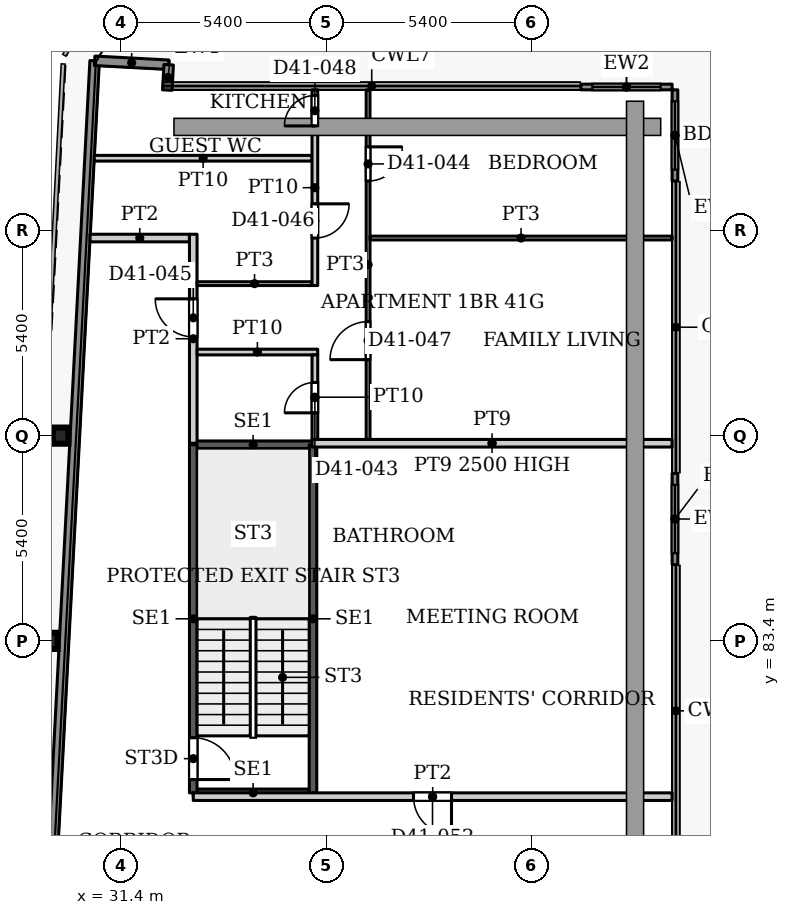
"""IFC4 building model, lengths in metres.
Left out: names, types, materials, properties, quantities, classifications, styles, units other than length and angle.
Written with IfcOpenShell. Run it as: python <this file> out.ifc"""

import sys

from ifc_helpers import new_model, si_unit, direction, frame, frame_2d, origin, origin_2d, place, context, subcontext, project, spatial, rectangle, i_section, extrude, source, transform, mapped, element, fill, save


model = new_model("IFC4")
c1 = context("Model", 3, precision=1e-05, world=origin(), true_north=direction((0.0, 1.0)))
c2 = subcontext(c1, "Body", "Model", "MODEL_VIEW")
j1 = project(units=[si_unit("LENGTHUNIT", "METRE"), si_unit("PLANEANGLEUNIT", "RADIAN")], contexts=[c1])
p1 = place(None, origin())
s1 = spatial("IfcSite", under=j1, at=p1, CompositionType="ELEMENT")
p2 = place(p1, origin())
s2 = spatial("IfcBuilding", under=s1, at=p2, CompositionType="ELEMENT")
p3 = place(p2, frame((0.0, 0.0, 176.0)))
s3 = spatial("IfcBuildingStorey", under=s2, at=p3, CompositionType="ELEMENT", Elevation=176.0)
for number, where, z_axis, x_axis in (
    (1, (29.527, 83.4, 0.0), (0.0, 0.0, 1.0), (1.0, 0.0, 0.0)),
    (2, (29.811, 88.8, 0.0), (0.0, 0.0, 1.0), (1.0, 0.0, 0.0)),
):
    element("IfcColumn", number, at=place(p3, frame(where, z_axis=z_axis, x_axis=x_axis)), inside=s3, PredefinedType="COLUMN", context=c2, shape_type="SweptSolid", body=[
        extrude(i_section(OverallWidth=0.409, OverallDepth=0.425, WebThickness=0.033, FlangeThickness=0.052, FilletRadius=0.013, at=origin_2d()), origin(), (0.0, 0.0, 1.0), 3.9),
    ])
p4 = place(p3, frame((27.195, 31.969, 0.0), z_axis=(0.0, 0.0, 1.0), x_axis=(0.052554995867, 0.998618031286, 0.0)))
e3 = element("IfcWall", 3, at=p4, inside=s3, PredefinedType="SOLIDWALL", context=c2, shape_type="SweptSolid", body=[
    extrude(rectangle(XDim=66.787, YDim=0.25, at=frame_2d((33.394, 0.0))), origin(), (0.0, 0.0, 1.0), 3.75),
])
p5 = place(p3, frame((30.705, 98.664, 0.0), z_axis=(0.0, 0.0, 1.0), x_axis=(0.998577785791, -0.053314216913, 0.0)))
e4 = element("IfcWall", 4, at=p5, inside=s3, PredefinedType="SOLIDWALL", context=c2, shape_type="SweptSolid", body=[
    extrude(rectangle(XDim=1.951, YDim=0.25, at=frame_2d((0.975, 0.0))), origin(), (0.0, 0.0, 1.0), 3.75),
])
p6 = place(p3, frame((32.653, 98.56, 0.0), z_axis=(0.0, 0.0, 1.0), x_axis=(-0.054093451632, -0.998535877418, 0.0)))
e5 = element("IfcWall", 5, at=p6, inside=s3, PredefinedType="SOLIDWALL", context=c2, shape_type="SweptSolid", body=[
    extrude(rectangle(XDim=0.668, YDim=0.25, at=frame_2d((0.334, 0.0))), origin(), (0.0, 0.0, 1.0), 3.75),
])
p7 = place(p3, frame((43.5, 97.975, 0.0), z_axis=(0.0, 0.0, 1.0), x_axis=(1.0, 0.0, 0.0)))
e6 = element("IfcWall", 6, at=p7, inside=s3, PredefinedType="SOLIDWALL", context=c2, shape_type="SweptSolid", body=[
    extrude(rectangle(XDim=2.4, YDim=0.15, at=frame_2d((1.2, 0.0))), origin(), (0.0, 0.0, 1.0), 3.75),
])
p8 = place(p7, frame((0.3, 0.0, 0.0)))
e7 = element("IfcOpeningElement", 7, at=p8, cuts=e6, PredefinedType="OPENING", context=c2, shape_type="SweptSolid", body=[
    extrude(rectangle(XDim=1.8, YDim=2.4, at=frame_2d((0.9, 1.2))), frame((0.0, 0.085, 0.0), z_axis=(0.0, -1.0, 0.0), x_axis=(1.0, 0.0, 0.0)), (0.0, 0.0, 1.0), 0.17),
])
p9 = place(p3, frame((45.975, 97.9, 0.0), z_axis=(0.0, 0.0, 1.0), x_axis=(0.0, -1.0, 0.0)))
e8 = element("IfcWall", 8, at=p9, inside=s3, PredefinedType="SOLIDWALL", context=c2, shape_type="SweptSolid", body=[
    extrude(rectangle(XDim=2.4, YDim=0.15, at=frame_2d((1.2, 0.0))), origin(), (0.0, 0.0, 1.0), 3.75),
])
p10 = place(p9, frame((0.3, 0.0, 0.0)))
e9 = element("IfcOpeningElement", 9, at=p10, cuts=e8, PredefinedType="OPENING", context=c2, shape_type="SweptSolid", body=[
    extrude(rectangle(XDim=1.8, YDim=2.4, at=frame_2d((0.9, 1.2))), frame((0.0, 0.085, 0.0), z_axis=(0.0, -1.0, 0.0), x_axis=(1.0, 0.0, 0.0)), (0.0, 0.0, 1.0), 0.17),
])
p11 = place(p3, frame((45.975, 87.806, 0.0), z_axis=(0.0, 0.0, 1.0), x_axis=(0.0, -1.0, 0.0)))
e10 = element("IfcWall", 10, at=p11, inside=s3, PredefinedType="SOLIDWALL", context=c2, shape_type="SweptSolid", body=[
    extrude(rectangle(XDim=2.4, YDim=0.15, at=frame_2d((1.2, 0.0))), origin(), (0.0, 0.0, 1.0), 3.75),
])
p12 = place(p11, frame((0.3, 0.0, 0.0)))
e11 = element("IfcOpeningElement", 11, at=p12, cuts=e10, PredefinedType="OPENING", context=c2, shape_type="SweptSolid", body=[
    extrude(rectangle(XDim=1.8, YDim=2.4, at=frame_2d((0.9, 1.2))), frame((0.0, 0.085, 0.0), z_axis=(0.0, -1.0, 0.0), x_axis=(1.0, 0.0, 0.0)), (0.0, 0.0, 1.0), 0.17),
])
for number, where, z_axis, x_axis in (
    (12, (33.3, 79.4, 0.0), (0.0, 0.0, 1.0), (1.0, 0.0, 0.0)),
    (13, (33.3, 88.56, 0.0), (0.0, 0.0, 1.0), (1.0, 0.0, 0.0)),
):
    element("IfcWall", number, at=place(p3, frame(where, z_axis=z_axis, x_axis=x_axis)), inside=s3, PredefinedType="SHEAR", context=c2, shape_type="SweptSolid", body=[
        extrude(rectangle(XDim=3.15, YDim=0.2, at=frame_2d((1.575, 0.0))), origin(), (0.0, 0.0, 1.0), 3.9),
    ])
p13 = place(p3, frame((33.3, 79.4, 0.0), z_axis=(0.0, 0.0, 1.0), x_axis=(0.0, 1.0, 0.0)))
e14 = element("IfcWall", 14, at=p13, inside=s3, PredefinedType="SHEAR", context=c2, shape_type="SweptSolid", body=[
    extrude(rectangle(XDim=9.16, YDim=0.2, at=frame_2d((4.58, 0.0))), origin(), (0.0, 0.0, 1.0), 3.9),
])
p14 = place(p13, frame((0.35, 0.0, 0.0)))
e15 = element("IfcOpeningElement", 15, at=p14, cuts=e14, PredefinedType="OPENING", context=c2, shape_type="SweptSolid", body=[
    extrude(rectangle(XDim=1.1, YDim=2.2, at=frame_2d((0.55, 1.1))), frame((0.0, 0.11, 0.0), z_axis=(0.0, -1.0, 0.0), x_axis=(1.0, 0.0, 0.0)), (0.0, 0.0, 1.0), 0.22),
])
p15 = place(p3, frame((36.45, 79.4, 0.0), z_axis=(0.0, 0.0, 1.0), x_axis=(0.0, 1.0, 0.0)))
e16 = element("IfcWall", 16, at=p15, inside=s3, PredefinedType="SHEAR", context=c2, shape_type="SweptSolid", body=[
    extrude(rectangle(XDim=9.16, YDim=0.2, at=frame_2d((4.58, 0.0))), origin(), (0.0, 0.0, 1.0), 3.9),
])
p16 = place(p3, frame((30.695, 96.1, 0.0), z_axis=(0.0, 0.0, 1.0), x_axis=(1.0, 0.0, 0.0)))
e17 = element("IfcWall", 17, at=p16, inside=s3, PredefinedType="PARTITIONING", context=c2, shape_type="SweptSolid", body=[
    extrude(rectangle(XDim=5.73, YDim=0.15, at=frame_2d((2.865, 0.0))), origin(), (0.0, 0.0, 1.0), 3.6),
])
p17 = place(p3, frame((30.585, 94.0, 0.0), z_axis=(0.0, 0.0, 1.0), x_axis=(1.0, 0.0, 0.0)))
e18 = element("IfcWall", 18, at=p17, inside=s3, PredefinedType="PARTITIONING", context=c2, shape_type="SweptSolid", body=[
    extrude(rectangle(XDim=2.615, YDim=0.2, at=frame_2d((1.308, 0.0))), origin(), (0.0, 0.0, 1.0), 3.6),
])
p18 = place(p3, frame((33.3, 79.3, 0.0), z_axis=(0.0, 0.0, 1.0), x_axis=(1.0, 0.0, 0.0)))
e19 = element("IfcWall", 19, at=p18, inside=s3, PredefinedType="PARTITIONING", context=c2, shape_type="SweptSolid", body=[
    extrude(rectangle(XDim=12.6, YDim=0.2, at=frame_2d((6.3, 0.0))), origin(), (0.0, 0.0, 1.0), 3.6),
])
p19 = place(p18, frame((5.795, 0.0, 0.0)))
e20 = element("IfcOpeningElement", 20, at=p19, cuts=e19, PredefinedType="OPENING", context=c2, shape_type="SweptSolid", body=[
    extrude(rectangle(XDim=1.0, YDim=2.1, at=frame_2d((0.5, 1.05))), frame((0.0, 0.11, 0.0), z_axis=(0.0, -1.0, 0.0), x_axis=(1.0, 0.0, 0.0)), (0.0, 0.0, 1.0), 0.22),
])
p20 = place(p3, frame((33.3, 88.6, 0.0), z_axis=(0.0, 0.0, 1.0), x_axis=(0.0, 1.0, 0.0)))
e21 = element("IfcWall", 21, at=p20, inside=s3, PredefinedType="PARTITIONING", context=c2, shape_type="SweptSolid", body=[
    extrude(rectangle(XDim=5.5, YDim=0.2, at=frame_2d((2.75, 0.0))), origin(), (0.0, 0.0, 1.0), 3.6),
])
p21 = place(p20, frame((2.8, 0.0, 0.0)))
e22 = element("IfcOpeningElement", 22, at=p21, cuts=e21, PredefinedType="OPENING", context=c2, shape_type="SweptSolid", body=[
    extrude(rectangle(XDim=1.0, YDim=2.1, at=frame_2d((0.5, 1.05))), frame((0.0, 0.11, 0.0), z_axis=(0.0, -1.0, 0.0), x_axis=(1.0, 0.0, 0.0)), (0.0, 0.0, 1.0), 0.22),
])
p22 = place(p3, frame((33.4, 91.0, 0.0), z_axis=(0.0, 0.0, 1.0), x_axis=(1.0, 0.0, 0.0)))
e23 = element("IfcWall", 23, at=p22, inside=s3, PredefinedType="PARTITIONING", context=c2, shape_type="SweptSolid", body=[
    extrude(rectangle(XDim=3.175, YDim=0.15, at=frame_2d((1.587, 0.0))), origin(), (0.0, 0.0, 1.0), 3.6),
])
p23 = place(p3, frame((33.4, 92.8, 0.0), z_axis=(0.0, 0.0, 1.0), x_axis=(1.0, 0.0, 0.0)))
e24 = element("IfcWall", 24, at=p23, inside=s3, PredefinedType="PARTITIONING", context=c2, shape_type="SweptSolid", body=[
    extrude(rectangle(XDim=3.025, YDim=0.1, at=frame_2d((1.513, 0.0))), origin(), (0.0, 0.0, 1.0), 3.6),
])
p24 = place(p3, frame((36.425, 88.6, 0.0), z_axis=(0.0, 0.0, 1.0), x_axis=(1.0, 0.0, 0.0)))
e25 = element("IfcWall", 25, at=p24, inside=s3, PredefinedType="PARTITIONING", context=c2, shape_type="SweptSolid", body=[
    extrude(rectangle(XDim=9.475, YDim=0.2, at=frame_2d((4.737, 0.0))), origin(), (0.0, 0.0, 1.0), 2.5),
])
p25 = place(p3, frame((36.5, 88.7, 0.0), z_axis=(0.0, 0.0, 1.0), x_axis=(0.0, 1.0, 0.0)))
e26 = element("IfcWall", 26, at=p25, inside=s3, PredefinedType="PARTITIONING", context=c2, shape_type="SweptSolid", body=[
    extrude(rectangle(XDim=2.225, YDim=0.15, at=frame_2d((1.113, 0.0))), origin(), (0.0, 0.0, 1.0), 3.6),
])
p26 = place(p25, frame((0.7, 0.0, 0.0)))
e27 = element("IfcOpeningElement", 27, at=p26, cuts=e26, PredefinedType="OPENING", context=c2, shape_type="SweptSolid", body=[
    extrude(rectangle(XDim=0.8, YDim=2.1, at=frame_2d((0.4, 1.05))), frame((0.0, 0.085, 0.0), z_axis=(0.0, -1.0, 0.0), x_axis=(1.0, 0.0, 0.0)), (0.0, 0.0, 1.0), 0.17),
])
p27 = place(p3, frame((36.5, 92.75, 0.0), z_axis=(0.0, 0.0, 1.0), x_axis=(0.0, 1.0, 0.0)))
e28 = element("IfcWall", 28, at=p27, inside=s3, PredefinedType="PARTITIONING", context=c2, shape_type="SweptSolid", body=[
    extrude(rectangle(XDim=5.15, YDim=0.15, at=frame_2d((2.575, 0.0))), origin(), (0.0, 0.0, 1.0), 3.6),
])
p28 = place(p27, frame((1.25, 0.0, 0.0)))
e29 = element("IfcOpeningElement", 29, at=p28, cuts=e28, PredefinedType="OPENING", context=c2, shape_type="SweptSolid", body=[
    extrude(rectangle(XDim=0.9, YDim=2.1, at=frame_2d((0.45, 1.05))), frame((0.0, 0.085, 0.0), z_axis=(0.0, -1.0, 0.0), x_axis=(1.0, 0.0, 0.0)), (0.0, 0.0, 1.0), 0.17),
])
p29 = place(p27, frame((4.2, 0.0, 0.0)))
e30 = element("IfcOpeningElement", 30, at=p29, cuts=e28, PredefinedType="OPENING", context=c2, shape_type="SweptSolid", body=[
    extrude(rectangle(XDim=0.8, YDim=2.1, at=frame_2d((0.4, 1.05))), frame((0.0, 0.085, 0.0), z_axis=(0.0, -1.0, 0.0), x_axis=(1.0, 0.0, 0.0)), (0.0, 0.0, 1.0), 0.17),
])
p30 = place(p3, frame((37.9, 88.7, 0.0), z_axis=(0.0, 0.0, 1.0), x_axis=(0.0, 1.0, 0.0)))
e31 = element("IfcWall", 31, at=p30, inside=s3, PredefinedType="PARTITIONING", context=c2, shape_type="SweptSolid", body=[
    extrude(rectangle(XDim=9.2, YDim=0.1, at=frame_2d((4.6, 0.0))), origin(), (0.0, 0.0, 1.0), 3.6),
])
p31 = place(p30, frame((6.8, 0.0, 0.0)))
e32 = element("IfcOpeningElement", 32, at=p31, cuts=e31, PredefinedType="OPENING", context=c2, shape_type="SweptSolid", body=[
    extrude(rectangle(XDim=0.9, YDim=2.1, at=frame_2d((0.45, 1.05))), frame((0.0, 0.06, 0.0), z_axis=(0.0, -1.0, 0.0), x_axis=(1.0, 0.0, 0.0)), (0.0, 0.0, 1.0), 0.12),
])
p32 = place(p30, frame((2.1, 0.0, 0.0)))
e33 = element("IfcOpeningElement", 33, at=p32, cuts=e31, PredefinedType="OPENING", context=c2, shape_type="SweptSolid", body=[
    extrude(rectangle(XDim=1.0, YDim=2.1, at=frame_2d((0.5, 1.05))), frame((0.0, 0.06, 0.0), z_axis=(0.0, -1.0, 0.0), x_axis=(1.0, 0.0, 0.0)), (0.0, 0.0, 1.0), 0.12),
])
p33 = place(p3, frame((37.95, 94.0, 0.0), z_axis=(0.0, 0.0, 1.0), x_axis=(1.0, 0.0, 0.0)))
e34 = element("IfcWall", 34, at=p33, inside=s3, PredefinedType="PARTITIONING", context=c2, shape_type="SweptSolid", body=[
    extrude(rectangle(XDim=7.95, YDim=0.1, at=frame_2d((3.975, 0.0))), origin(), (0.0, 0.0, 1.0), 3.6),
])
m1 = source(origin(), c2, "Body", "SweptSolid", [
    extrude(rectangle(XDim=1.8, YDim=2.4, at=frame_2d((0.9, 1.2))), frame((0.0, 0.025, 0.0), z_axis=(0.0, -1.0, 0.0), x_axis=(1.0, 0.0, 0.0)), (0.0, 0.0, 1.0), 0.05),
])
p34 = place(p8, origin())
e35 = element("IfcDoor", 35, at=p34, inside=s3, OperationType="SLIDING_TO_LEFT", PredefinedType="DOOR", context=c2, shape_type="MappedRepresentation", body=[
    mapped(m1, transform((0.0, 0.0, 0.0), x_axis=(1.0, 0.0, 0.0), y_axis=(0.0, 1.0, 0.0), z_axis=(0.0, 0.0, 1.0), scale=1.0)),
])
fill(e7, e35)
p35 = place(p10, origin())
e36 = element("IfcDoor", 36, at=p35, inside=s3, OperationType="SLIDING_TO_LEFT", PredefinedType="DOOR", context=c2, shape_type="MappedRepresentation", body=[
    mapped(m1, transform((0.0, 0.0, 0.0), x_axis=(1.0, 0.0, 0.0), y_axis=(0.0, 1.0, 0.0), z_axis=(0.0, 0.0, 1.0), scale=1.0)),
])
fill(e9, e36)
p36 = place(p12, origin())
e37 = element("IfcDoor", 37, at=p36, inside=s3, OperationType="SLIDING_TO_LEFT", PredefinedType="DOOR", context=c2, shape_type="MappedRepresentation", body=[
    mapped(m1, transform((0.0, 0.0, 0.0), x_axis=(1.0, 0.0, 0.0), y_axis=(0.0, 1.0, 0.0), z_axis=(0.0, 0.0, 1.0), scale=1.0)),
])
fill(e11, e37)
m2 = source(origin(), c2, "Body", "SweptSolid", [
    extrude(rectangle(XDim=1.1, YDim=2.2, at=frame_2d((0.55, 1.1))), frame((0.0, 0.025, 0.0), z_axis=(0.0, -1.0, 0.0), x_axis=(1.0, 0.0, 0.0)), (0.0, 0.0, 1.0), 0.05),
])
p37 = place(p14, origin())
e38 = element("IfcDoor", 38, at=p37, inside=s3, OperationType="SINGLE_SWING_RIGHT", PredefinedType="DOOR", context=c2, shape_type="MappedRepresentation", body=[
    mapped(m2, transform((0.0, 0.0, 0.0), x_axis=(1.0, 0.0, 0.0), y_axis=(0.0, 1.0, 0.0), z_axis=(0.0, 0.0, 1.0), scale=1.0)),
])
fill(e15, e38)
m3 = source(origin(), c2, "Body", "SweptSolid", [
    extrude(rectangle(XDim=0.8, YDim=2.1, at=frame_2d((0.4, 1.05))), frame((0.0, 0.025, 0.0), z_axis=(0.0, -1.0, 0.0), x_axis=(1.0, 0.0, 0.0)), (0.0, 0.0, 1.0), 0.05),
])
p38 = place(p26, origin())
e39 = element("IfcDoor", 39, at=p38, inside=s3, OperationType="SINGLE_SWING_LEFT", PredefinedType="DOOR", context=c2, shape_type="MappedRepresentation", body=[
    mapped(m3, transform((0.0, 0.0, 0.0), x_axis=(1.0, 0.0, 0.0), y_axis=(0.0, 1.0, 0.0), z_axis=(0.0, 0.0, 1.0), scale=1.0)),
])
fill(e27, e39)
m4 = source(origin(), c2, "Body", "SweptSolid", [
    extrude(rectangle(XDim=0.9, YDim=2.1, at=frame_2d((0.45, 1.05))), frame((0.0, 0.025, 0.0), z_axis=(0.0, -1.0, 0.0), x_axis=(1.0, 0.0, 0.0)), (0.0, 0.0, 1.0), 0.05),
])
p39 = place(p31, origin())
e40 = element("IfcDoor", 40, at=p39, inside=s3, OperationType="SINGLE_SWING_RIGHT", PredefinedType="DOOR", context=c2, shape_type="MappedRepresentation", body=[
    mapped(m4, transform((0.0, 0.0, 0.0), x_axis=(1.0, 0.0, 0.0), y_axis=(0.0, 1.0, 0.0), z_axis=(0.0, 0.0, 1.0), scale=1.0)),
])
fill(e32, e40)
m5 = source(origin(), c2, "Body", "SweptSolid", [
    extrude(rectangle(XDim=1.0, YDim=2.1, at=frame_2d((0.5, 1.05))), frame((0.0, 0.025, 0.0), z_axis=(0.0, -1.0, 0.0), x_axis=(1.0, 0.0, 0.0)), (0.0, 0.0, 1.0), 0.05),
])
p40 = place(p21, origin())
e41 = element("IfcDoor", 41, at=p40, inside=s3, OperationType="SINGLE_SWING_LEFT", PredefinedType="DOOR", context=c2, shape_type="MappedRepresentation", body=[
    mapped(m5, transform((0.0, 0.0, 0.0), x_axis=(1.0, 0.0, 0.0), y_axis=(0.0, 1.0, 0.0), z_axis=(0.0, 0.0, 1.0), scale=1.0)),
])
fill(e22, e41)
p41 = place(p28, origin())
e42 = element("IfcDoor", 42, at=p41, inside=s3, OperationType="SINGLE_SWING_RIGHT", PredefinedType="DOOR", context=c2, shape_type="MappedRepresentation", body=[
    mapped(m4, transform((0.0, 0.0, 0.0), x_axis=(1.0, 0.0, 0.0), y_axis=(0.0, 1.0, 0.0), z_axis=(0.0, 0.0, 1.0), scale=1.0)),
])
fill(e29, e42)
m6 = source(origin(), c2, "Body", "SweptSolid", [
    extrude(rectangle(XDim=1.0, YDim=2.1, at=frame_2d((0.5, 1.05))), frame((0.0, 0.025, 0.0), z_axis=(0.0, -1.0, 0.0), x_axis=(1.0, 0.0, 0.0)), (0.0, 0.0, 1.0), 0.05),
])
p42 = place(p32, origin())
e43 = element("IfcDoor", 43, at=p42, inside=s3, OperationType="SINGLE_SWING_LEFT", PredefinedType="DOOR", context=c2, shape_type="MappedRepresentation", body=[
    mapped(m6, transform((0.0, 0.0, 0.0), x_axis=(1.0, 0.0, 0.0), y_axis=(0.0, 1.0, 0.0), z_axis=(0.0, 0.0, 1.0), scale=1.0)),
])
fill(e33, e43)
p43 = place(p29, origin())
e44 = element("IfcDoor", 44, at=p43, inside=s3, OperationType="SINGLE_SWING_LEFT", PredefinedType="DOOR", context=c2, shape_type="MappedRepresentation", body=[
    mapped(m3, transform((0.0, 0.0, 0.0), x_axis=(1.0, 0.0, 0.0), y_axis=(0.0, 1.0, 0.0), z_axis=(0.0, 0.0, 1.0), scale=1.0)),
])
fill(e30, e44)
m7 = source(origin(), c2, "Body", "SweptSolid", [
    extrude(rectangle(XDim=1.0, YDim=2.1, at=frame_2d((0.5, 1.05))), frame((0.0, 0.025, 0.0), z_axis=(0.0, -1.0, 0.0), x_axis=(1.0, 0.0, 0.0)), (0.0, 0.0, 1.0), 0.05),
])
p44 = place(p19, origin())
e45 = element("IfcDoor", 45, at=p44, inside=s3, OperationType="SINGLE_SWING_RIGHT", PredefinedType="DOOR", context=c2, shape_type="MappedRepresentation", body=[
    mapped(m7, transform((0.0, 0.0, 0.0), x_axis=(1.0, 0.0, 0.0), y_axis=(0.0, 1.0, 0.0), z_axis=(0.0, 0.0, 1.0), scale=1.0)),
])
fill(e20, e45)
save(model, sys.argv[1])
